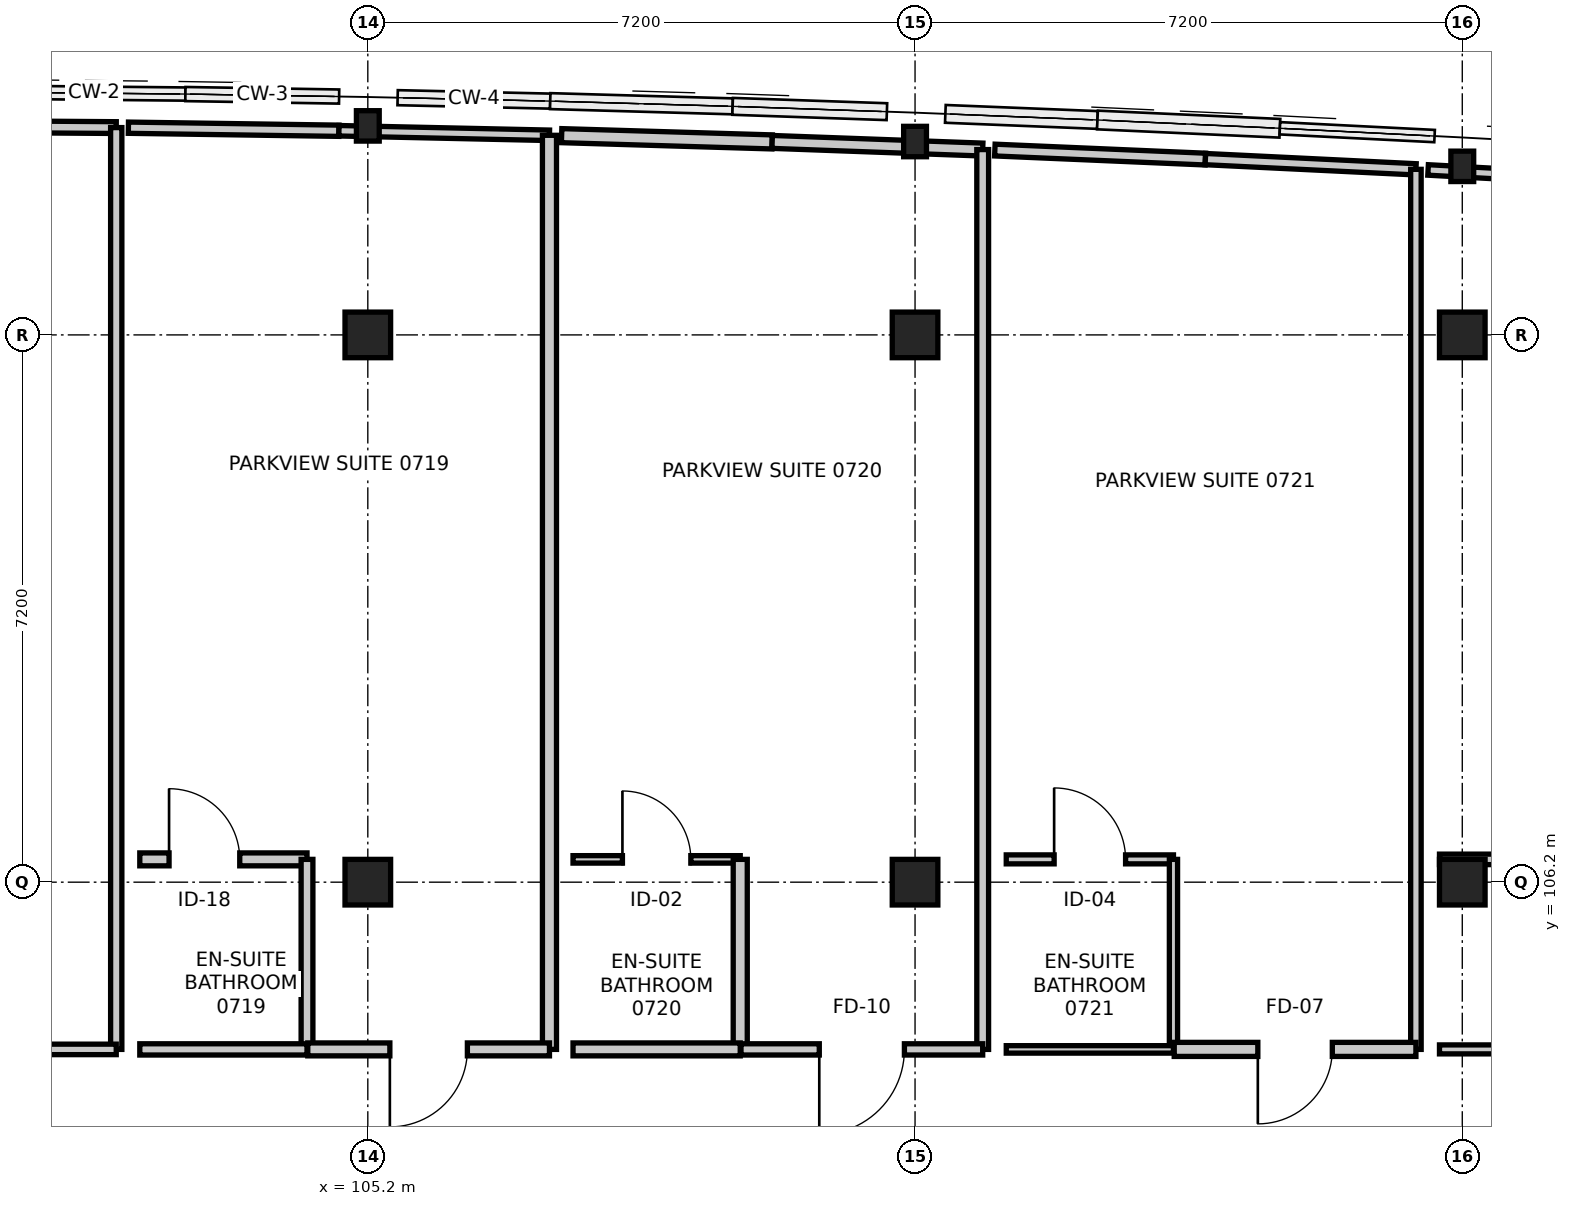
"""IFC4 building model, lengths in metres.
Left out: names, types, materials, properties, quantities, classifications, styles, units other than length and angle.
Written with IfcOpenShell. Run it as: python <this file> out.ifc"""

import sys

from ifc_helpers import new_model, si_unit, direction, frame, frame_2d, origin, origin_2d, place, context, subcontext, project, spatial, rectangle, i_section, extrude, element, fill, save


model = new_model("IFC4")
c1 = context("Model", 3, precision=1e-05, world=origin(), true_north=direction((0.0, 1.0)))
c2 = subcontext(c1, "Body", "Model", "MODEL_VIEW")
j1 = project(units=[si_unit("LENGTHUNIT", "METRE"), si_unit("PLANEANGLEUNIT", "RADIAN")], contexts=[c1])
p1 = place(None, origin())
s1 = spatial("IfcSite", under=j1, at=p1, CompositionType="ELEMENT")
p2 = place(p1, origin())
s2 = spatial("IfcBuilding", under=s1, at=p2, CompositionType="ELEMENT")
p3 = place(p2, frame((0.0, 0.0, 30.0)))
s3 = spatial("IfcBuildingStorey", under=s2, at=p3, CompositionType="ELEMENT", Elevation=30.0)
for number, where, z_axis, x_axis in (
    (1, (105.2, 106.2, 0.0), (0.0, 0.0, 1.0), (1.0, 0.0, 0.0)),
    (2, (105.2, 113.4, 0.0), (0.0, 0.0, 1.0), (1.0, 0.0, 0.0)),
):
    element("IfcColumn", number, at=place(p3, frame(where, z_axis=z_axis, x_axis=x_axis)), inside=s3, PredefinedType="COLUMN", context=c2, shape_type="SweptSolid", body=[
        extrude(rectangle(XDim=0.6, YDim=0.6, at=origin_2d()), origin(), (0.0, 0.0, 1.0), 3.6),
    ])
p4 = place(p3, frame((105.2, 116.15, 0.0), z_axis=(0.0, 0.0, 1.0), x_axis=(1.0, 0.0, 0.0)))
e3 = element("IfcColumn", 3, at=p4, inside=s3, PredefinedType="COLUMN", context=c2, shape_type="SweptSolid", body=[
    extrude(i_section(OverallWidth=0.3, OverallDepth=0.4, WebThickness=0.013, FlangeThickness=0.024, FilletRadius=0.027, at=origin_2d()), origin(), (0.0, 0.0, 1.0), 3.6),
])
for number, where, z_axis, x_axis in (
    (4, (112.4, 106.2, 0.0), (0.0, 0.0, 1.0), (1.0, 0.0, 0.0)),
    (5, (112.4, 113.4, 0.0), (0.0, 0.0, 1.0), (1.0, 0.0, 0.0)),
):
    element("IfcColumn", number, at=place(p3, frame(where, z_axis=z_axis, x_axis=x_axis)), inside=s3, PredefinedType="COLUMN", context=c2, shape_type="SweptSolid", body=[
        extrude(rectangle(XDim=0.6, YDim=0.6, at=origin_2d()), origin(), (0.0, 0.0, 1.0), 3.6),
    ])
p5 = place(p3, frame((112.4, 115.944, 0.0), z_axis=(0.0, 0.0, 1.0), x_axis=(1.0, 0.0, 0.0)))
e6 = element("IfcColumn", 6, at=p5, inside=s3, PredefinedType="COLUMN", context=c2, shape_type="SweptSolid", body=[
    extrude(i_section(OverallWidth=0.3, OverallDepth=0.4, WebThickness=0.013, FlangeThickness=0.024, FilletRadius=0.027, at=origin_2d()), origin(), (0.0, 0.0, 1.0), 3.6),
])
for number, where, z_axis, x_axis in (
    (7, (119.6, 106.2, 0.0), (0.0, 0.0, 1.0), (1.0, 0.0, 0.0)),
    (8, (119.6, 113.4, 0.0), (0.0, 0.0, 1.0), (1.0, 0.0, 0.0)),
):
    element("IfcColumn", number, at=place(p3, frame(where, z_axis=z_axis, x_axis=x_axis)), inside=s3, PredefinedType="COLUMN", context=c2, shape_type="SweptSolid", body=[
        extrude(rectangle(XDim=0.6, YDim=0.6, at=origin_2d()), origin(), (0.0, 0.0, 1.0), 3.6),
    ])
p6 = place(p3, frame((119.6, 115.618, 0.0), z_axis=(0.0, 0.0, 1.0), x_axis=(1.0, 0.0, 0.0)))
e9 = element("IfcColumn", 9, at=p6, inside=s3, PredefinedType="COLUMN", context=c2, shape_type="SweptSolid", body=[
    extrude(i_section(OverallWidth=0.3, OverallDepth=0.4, WebThickness=0.013, FlangeThickness=0.024, FilletRadius=0.027, at=origin_2d()), origin(), (0.0, 0.0, 1.0), 3.6),
])
p7 = place(p3, frame((99.12, 116.146, 0.0), z_axis=(0.0, 0.0, 1.0), x_axis=(0.999977562546, -0.006698836029, 0.0)))
e10 = element("IfcWall", 10, at=p7, inside=s3, PredefinedType="PARTITIONING", context=c2, shape_type="SweptSolid", body=[
    extrude(rectangle(XDim=2.77, YDim=0.155, at=frame_2d((1.385, 0.0))), origin(), (0.0, 0.0, 1.0), 2.936),
])
p8 = place(p3, frame((101.89, 116.128, 0.0), z_axis=(0.0, 0.0, 1.0), x_axis=(0.0, -1.0, 0.0)))
e11 = element("IfcWall", 11, at=p8, inside=s3, PredefinedType="PARTITIONING", context=c2, shape_type="SweptSolid", body=[
    extrude(rectangle(XDim=12.128, YDim=0.148, at=frame_2d((6.064, 0.0))), origin(), (0.0, 0.0, 1.0), 2.745),
])
p9 = place(p3, frame((101.89, 104.0, 0.0), z_axis=(0.0, 0.0, 1.0), x_axis=(-1.0, 0.0, 0.0)))
e12 = element("IfcWall", 12, at=p9, inside=s3, PredefinedType="PARTITIONING", context=c2, shape_type="SweptSolid", body=[
    extrude(rectangle(XDim=3.18, YDim=0.138, at=frame_2d((1.59, 0.0))), origin(), (0.0, 0.0, 1.0), 3.36),
])
p10 = place(p9, frame((1.115, 0.0, 0.0)))
e13 = element("IfcOpeningElement", 13, at=p10, cuts=e12, PredefinedType="OPENING", context=c2, shape_type="SweptSolid", body=[
    extrude(rectangle(XDim=0.95, YDim=2.1, at=frame_2d((0.475, 1.05))), frame((0.0, 0.079, 0.0), z_axis=(0.0, -1.0, 0.0), x_axis=(1.0, 0.0, 0.0)), (0.0, 0.0, 1.0), 0.158),
])
p11 = place(p3, frame((102.2, 106.5, 0.0), z_axis=(0.0, 0.0, 1.0), x_axis=(1.0, 0.0, 0.0)))
e14 = element("IfcWall", 14, at=p11, inside=s3, PredefinedType="PARTITIONING", context=c2, shape_type="SweptSolid", body=[
    extrude(rectangle(XDim=2.2, YDim=0.17, at=frame_2d((1.1, 0.0))), origin(), (0.0, 0.0, 1.0), 2.745),
])
p12 = place(p11, frame((0.385, 0.0, 0.0)))
e15 = element("IfcOpeningElement", 15, at=p12, cuts=e14, PredefinedType="OPENING", context=c2, shape_type="SweptSolid", body=[
    extrude(rectangle(XDim=0.93, YDim=2.13, at=frame_2d((0.465, 1.065))), frame((0.0, 0.095, 0.0), z_axis=(0.0, -1.0, 0.0), x_axis=(1.0, 0.0, 0.0)), (0.0, 0.0, 1.0), 0.19),
])
p13 = place(p3, frame((104.4, 106.5, 0.0), z_axis=(0.0, 0.0, 1.0), x_axis=(0.0, -1.0, 0.0)))
e16 = element("IfcWall", 16, at=p13, inside=s3, PredefinedType="PARTITIONING", context=c2, shape_type="SweptSolid", body=[
    extrude(rectangle(XDim=2.5, YDim=0.155, at=frame_2d((1.25, 0.0))), origin(), (0.0, 0.0, 1.0), 2.745),
])
p14 = place(p3, frame((104.4, 104.0, 0.0), z_axis=(0.0, 0.0, 1.0), x_axis=(-1.0, 0.0, 0.0)))
e17 = element("IfcWall", 17, at=p14, inside=s3, PredefinedType="PARTITIONING", context=c2, shape_type="SweptSolid", body=[
    extrude(rectangle(XDim=2.2, YDim=0.148, at=frame_2d((1.1, 0.0))), origin(), (0.0, 0.0, 1.0), 3.36),
])
p15 = place(p3, frame((102.05, 116.126, 0.0), z_axis=(0.0, 0.0, 1.0), x_axis=(0.999895551046, -0.01445292353, 0.0)))
e18 = element("IfcWall", 18, at=p15, inside=s3, PredefinedType="PARTITIONING", context=c2, shape_type="SweptSolid", body=[
    extrude(rectangle(XDim=2.77, YDim=0.148, at=frame_2d((1.385, 0.0))), origin(), (0.0, 0.0, 1.0), 2.936),
])
p16 = place(p3, frame((104.82, 116.086, 0.0), z_axis=(0.0, 0.0, 1.0), x_axis=(0.999765035867, -0.021676555511, 0.0)))
e19 = element("IfcWall", 19, at=p16, inside=s3, PredefinedType="PARTITIONING", context=c2, shape_type="SweptSolid", body=[
    extrude(rectangle(XDim=2.771, YDim=0.138, at=frame_2d((1.385, 0.0))), origin(), (0.0, 0.0, 1.0), 2.936),
])
p17 = place(p3, frame((107.59, 116.026, 0.0), z_axis=(0.0, 0.0, 1.0), x_axis=(0.0, -1.0, 0.0)))
e20 = element("IfcWall", 20, at=p17, inside=s3, PredefinedType="PARTITIONING", context=c2, shape_type="SweptSolid", body=[
    extrude(rectangle(XDim=12.026, YDim=0.185, at=frame_2d((6.013, 0.0))), origin(), (0.0, 0.0, 1.0), 2.745),
])
p18 = place(p3, frame((107.59, 104.0, 0.0), z_axis=(0.0, 0.0, 1.0), x_axis=(-1.0, 0.0, 0.0)))
e21 = element("IfcWall", 21, at=p18, inside=s3, PredefinedType="PARTITIONING", context=c2, shape_type="SweptSolid", body=[
    extrude(rectangle(XDim=3.18, YDim=0.17, at=frame_2d((1.59, 0.0))), origin(), (0.0, 0.0, 1.0), 2.695),
])
p19 = place(p18, frame((1.08, 0.0, 0.0)))
e22 = element("IfcOpeningElement", 22, at=p19, cuts=e21, PredefinedType="OPENING", context=c2, shape_type="SweptSolid", body=[
    extrude(rectangle(XDim=1.02, YDim=2.15, at=frame_2d((0.51, 1.075))), frame((0.0, 0.095, 0.0), z_axis=(0.0, -1.0, 0.0), x_axis=(1.0, 0.0, 0.0)), (0.0, 0.0, 1.0), 0.19),
])
p20 = place(p3, frame((107.9, 106.5, 0.0), z_axis=(0.0, 0.0, 1.0), x_axis=(1.0, 0.0, 0.0)))
e23 = element("IfcWall", 23, at=p20, inside=s3, PredefinedType="PARTITIONING", context=c2, shape_type="SweptSolid", body=[
    extrude(rectangle(XDim=2.2, YDim=0.098, at=frame_2d((1.1, 0.0))), origin(), (0.0, 0.0, 1.0), 3.36),
])
p21 = place(p20, frame((0.65, 0.0, 0.0)))
e24 = element("IfcOpeningElement", 24, at=p21, cuts=e23, PredefinedType="OPENING", context=c2, shape_type="SweptSolid", body=[
    extrude(rectangle(XDim=0.9, YDim=2.08, at=frame_2d((0.45, 1.04))), frame((0.0, 0.059, 0.0), z_axis=(0.0, -1.0, 0.0), x_axis=(1.0, 0.0, 0.0)), (0.0, 0.0, 1.0), 0.118),
])
p22 = place(p3, frame((110.1, 106.5, 0.0), z_axis=(0.0, 0.0, 1.0), x_axis=(0.0, -1.0, 0.0)))
e25 = element("IfcWall", 25, at=p22, inside=s3, PredefinedType="PARTITIONING", context=c2, shape_type="SweptSolid", body=[
    extrude(rectangle(XDim=2.5, YDim=0.185, at=frame_2d((1.25, 0.0))), origin(), (0.0, 0.0, 1.0), 2.745),
])
p23 = place(p3, frame((110.1, 104.0, 0.0), z_axis=(0.0, 0.0, 1.0), x_axis=(-1.0, 0.0, 0.0)))
e26 = element("IfcWall", 26, at=p23, inside=s3, PredefinedType="PARTITIONING", context=c2, shape_type="SweptSolid", body=[
    extrude(rectangle(XDim=2.2, YDim=0.17, at=frame_2d((1.1, 0.0))), origin(), (0.0, 0.0, 1.0), 3.36),
])
p24 = place(p3, frame((107.75, 116.021, 0.0), z_axis=(0.0, 0.0, 1.0), x_axis=(0.999556566091, -0.029777024444, 0.0)))
e27 = element("IfcWall", 27, at=p24, inside=s3, PredefinedType="PARTITIONING", context=c2, shape_type="SweptSolid", body=[
    extrude(rectangle(XDim=2.771, YDim=0.185, at=frame_2d((1.386, 0.0))), origin(), (0.0, 0.0, 1.0), 2.936),
])
p25 = place(p3, frame((110.52, 115.939, 0.0), z_axis=(0.0, 0.0, 1.0), x_axis=(0.999341357659, -0.036288439922, 0.0)))
e28 = element("IfcWall", 28, at=p25, inside=s3, PredefinedType="PARTITIONING", context=c2, shape_type="SweptSolid", body=[
    extrude(rectangle(XDim=2.772, YDim=0.17, at=frame_2d((1.386, 0.0))), origin(), (0.0, 0.0, 1.0), 2.936),
])
p26 = place(p3, frame((113.29, 115.838, 0.0), z_axis=(0.0, 0.0, 1.0), x_axis=(0.0, -1.0, 0.0)))
e29 = element("IfcWall", 29, at=p26, inside=s3, PredefinedType="PARTITIONING", context=c2, shape_type="SweptSolid", body=[
    extrude(rectangle(XDim=11.838, YDim=0.155, at=frame_2d((5.919, 0.0))), origin(), (0.0, 0.0, 1.0), 2.745),
])
p27 = place(p3, frame((113.29, 104.0, 0.0), z_axis=(0.0, 0.0, 1.0), x_axis=(-1.0, 0.0, 0.0)))
e30 = element("IfcWall", 30, at=p27, inside=s3, PredefinedType="PARTITIONING", context=c2, shape_type="SweptSolid", body=[
    extrude(rectangle(XDim=3.18, YDim=0.148, at=frame_2d((1.59, 0.0))), origin(), (0.0, 0.0, 1.0), 2.695),
])
p28 = place(p27, frame((1.03, 0.0, 0.0)))
e31 = element("IfcOpeningElement", 31, at=p28, cuts=e30, PredefinedType="OPENING", context=c2, shape_type="SweptSolid", body=[
    extrude(rectangle(XDim=1.12, YDim=2.2, at=frame_2d((0.56, 1.1))), frame((0.0, 0.084, 0.0), z_axis=(0.0, -1.0, 0.0), x_axis=(1.0, 0.0, 0.0)), (0.0, 0.0, 1.0), 0.168),
])
p29 = place(p3, frame((113.6, 106.5, 0.0), z_axis=(0.0, 0.0, 1.0), x_axis=(1.0, 0.0, 0.0)))
e32 = element("IfcWall", 32, at=p29, inside=s3, PredefinedType="PARTITIONING", context=c2, shape_type="SweptSolid", body=[
    extrude(rectangle(XDim=2.2, YDim=0.118, at=frame_2d((1.1, 0.0))), origin(), (0.0, 0.0, 1.0), 3.36),
])
p30 = place(p29, frame((0.63, 0.0, 0.0)))
e33 = element("IfcOpeningElement", 33, at=p30, cuts=e32, PredefinedType="OPENING", context=c2, shape_type="SweptSolid", body=[
    extrude(rectangle(XDim=0.94, YDim=2.12, at=frame_2d((0.47, 1.06))), frame((0.0, 0.069, 0.0), z_axis=(0.0, -1.0, 0.0), x_axis=(1.0, 0.0, 0.0)), (0.0, 0.0, 1.0), 0.138),
])
p31 = place(p3, frame((115.8, 106.5, 0.0), z_axis=(0.0, 0.0, 1.0), x_axis=(0.0, -1.0, 0.0)))
e34 = element("IfcWall", 34, at=p31, inside=s3, PredefinedType="PARTITIONING", context=c2, shape_type="SweptSolid", body=[
    extrude(rectangle(XDim=2.5, YDim=0.108, at=frame_2d((1.25, 0.0))), origin(), (0.0, 0.0, 1.0), 2.745),
])
p32 = place(p3, frame((115.8, 104.0, 0.0), z_axis=(0.0, 0.0, 1.0), x_axis=(-1.0, 0.0, 0.0)))
e35 = element("IfcWall", 35, at=p32, inside=s3, PredefinedType="PARTITIONING", context=c2, shape_type="SweptSolid", body=[
    extrude(rectangle(XDim=2.2, YDim=0.098, at=frame_2d((1.1, 0.0))), origin(), (0.0, 0.0, 1.0), 3.36),
])
p33 = place(p3, frame((113.45, 115.832, 0.0), z_axis=(0.0, 0.0, 1.0), x_axis=(0.999083864196, -0.042795236912, 0.0)))
e36 = element("IfcWall", 36, at=p33, inside=s3, PredefinedType="PARTITIONING", context=c2, shape_type="SweptSolid", body=[
    extrude(rectangle(XDim=2.772, YDim=0.155, at=frame_2d((1.386, 0.0))), origin(), (0.0, 0.0, 1.0), 2.936),
])
p34 = place(p3, frame((116.22, 115.713, 0.0), z_axis=(0.0, 0.0, 1.0), x_axis=(0.998818612245, -0.048594030844, 0.0)))
e37 = element("IfcWall", 37, at=p34, inside=s3, PredefinedType="PARTITIONING", context=c2, shape_type="SweptSolid", body=[
    extrude(rectangle(XDim=2.773, YDim=0.148, at=frame_2d((1.387, 0.0))), origin(), (0.0, 0.0, 1.0), 2.936),
])
p35 = place(p3, frame((118.99, 115.578, 0.0), z_axis=(0.0, 0.0, 1.0), x_axis=(0.0, -1.0, 0.0)))
e38 = element("IfcWall", 38, at=p35, inside=s3, PredefinedType="PARTITIONING", context=c2, shape_type="SweptSolid", body=[
    extrude(rectangle(XDim=11.578, YDim=0.138, at=frame_2d((5.789, 0.0))), origin(), (0.0, 0.0, 1.0), 2.745),
])
p36 = place(p3, frame((118.99, 104.0, 0.0), z_axis=(0.0, 0.0, 1.0), x_axis=(-1.0, 0.0, 0.0)))
e39 = element("IfcWall", 39, at=p36, inside=s3, PredefinedType="PARTITIONING", context=c2, shape_type="SweptSolid", body=[
    extrude(rectangle(XDim=3.18, YDim=0.185, at=frame_2d((1.59, 0.0))), origin(), (0.0, 0.0, 1.0), 3.36),
])
p37 = place(p36, frame((1.1, 0.0, 0.0)))
e40 = element("IfcOpeningElement", 40, at=p37, cuts=e39, PredefinedType="OPENING", context=c2, shape_type="SweptSolid", body=[
    extrude(rectangle(XDim=0.98, YDim=2.15, at=frame_2d((0.49, 1.075))), frame((0.0, 0.103, 0.0), z_axis=(0.0, -1.0, 0.0), x_axis=(1.0, 0.0, 0.0)), (0.0, 0.0, 1.0), 0.205),
])
p38 = place(p3, frame((119.3, 106.5, 0.0), z_axis=(0.0, 0.0, 1.0), x_axis=(1.0, 0.0, 0.0)))
e41 = element("IfcWall", 41, at=p38, inside=s3, PredefinedType="PARTITIONING", context=c2, shape_type="SweptSolid", body=[
    extrude(rectangle(XDim=2.2, YDim=0.138, at=frame_2d((1.1, 0.0))), origin(), (0.0, 0.0, 1.0), 2.695),
])
p39 = place(p3, frame((121.5, 104.0, 0.0), z_axis=(0.0, 0.0, 1.0), x_axis=(-1.0, 0.0, 0.0)))
e42 = element("IfcWall", 42, at=p39, inside=s3, PredefinedType="PARTITIONING", context=c2, shape_type="SweptSolid", body=[
    extrude(rectangle(XDim=2.2, YDim=0.118, at=frame_2d((1.1, 0.0))), origin(), (0.0, 0.0, 1.0), 2.695),
])
p40 = place(p3, frame((119.15, 115.57, 0.0), z_axis=(0.0, 0.0, 1.0), x_axis=(0.998534185655, -0.054124671618, 0.0)))
e43 = element("IfcWall", 43, at=p40, inside=s3, PredefinedType="PARTITIONING", context=c2, shape_type="SweptSolid", body=[
    extrude(rectangle(XDim=2.774, YDim=0.138, at=frame_2d((1.387, 0.0))), origin(), (0.0, 0.0, 1.0), 2.936),
])
p41 = place(p12, origin())
e44 = element("IfcDoor", 44, at=p41, inside=s3, OperationType="SINGLE_SWING_LEFT", PredefinedType="DOOR", context=c2, shape_type="SweptSolid", body=[
    extrude(rectangle(XDim=0.93, YDim=2.13, at=frame_2d((0.465, 1.065))), frame((0.0, 0.025, 0.0), z_axis=(0.0, -1.0, 0.0), x_axis=(1.0, 0.0, 0.0)), (0.0, 0.0, 1.0), 0.05),
])
fill(e15, e44)
p42 = place(p19, origin())
e45 = element("IfcDoor", 45, at=p42, inside=s3, OperationType="SINGLE_SWING_RIGHT", PredefinedType="DOOR", context=c2, shape_type="SweptSolid", body=[
    extrude(rectangle(XDim=1.02, YDim=2.15, at=frame_2d((0.51, 1.075))), frame((0.0, 0.025, 0.0), z_axis=(0.0, -1.0, 0.0), x_axis=(1.0, 0.0, 0.0)), (0.0, 0.0, 1.0), 0.05),
])
fill(e22, e45)
p43 = place(p21, origin())
e46 = element("IfcDoor", 46, at=p43, inside=s3, OperationType="SINGLE_SWING_LEFT", PredefinedType="DOOR", context=c2, shape_type="SweptSolid", body=[
    extrude(rectangle(XDim=0.9, YDim=2.08, at=frame_2d((0.45, 1.04))), frame((0.0, 0.025, 0.0), z_axis=(0.0, -1.0, 0.0), x_axis=(1.0, 0.0, 0.0)), (0.0, 0.0, 1.0), 0.05),
])
fill(e24, e46)
p44 = place(p28, origin())
e47 = element("IfcDoor", 47, at=p44, inside=s3, OperationType="SINGLE_SWING_RIGHT", PredefinedType="DOOR", context=c2, shape_type="SweptSolid", body=[
    extrude(rectangle(XDim=1.12, YDim=2.2, at=frame_2d((0.56, 1.1))), frame((0.0, 0.025, 0.0), z_axis=(0.0, -1.0, 0.0), x_axis=(1.0, 0.0, 0.0)), (0.0, 0.0, 1.0), 0.05),
])
fill(e31, e47)
p45 = place(p30, origin())
e48 = element("IfcDoor", 48, at=p45, inside=s3, OperationType="SINGLE_SWING_LEFT", PredefinedType="DOOR", context=c2, shape_type="SweptSolid", body=[
    extrude(rectangle(XDim=0.94, YDim=2.12, at=frame_2d((0.47, 1.06))), frame((0.0, 0.025, 0.0), z_axis=(0.0, -1.0, 0.0), x_axis=(1.0, 0.0, 0.0)), (0.0, 0.0, 1.0), 0.05),
])
fill(e33, e48)
p46 = place(p37, origin())
e49 = element("IfcDoor", 49, at=p46, inside=s3, OperationType="SINGLE_SWING_RIGHT", PredefinedType="DOOR", context=c2, shape_type="SweptSolid", body=[
    extrude(rectangle(XDim=0.98, YDim=2.15, at=frame_2d((0.49, 1.075))), frame((0.0, 0.025, 0.0), z_axis=(0.0, -1.0, 0.0), x_axis=(1.0, 0.0, 0.0)), (0.0, 0.0, 1.0), 0.05),
])
fill(e40, e49)
save(model, sys.argv[1])
